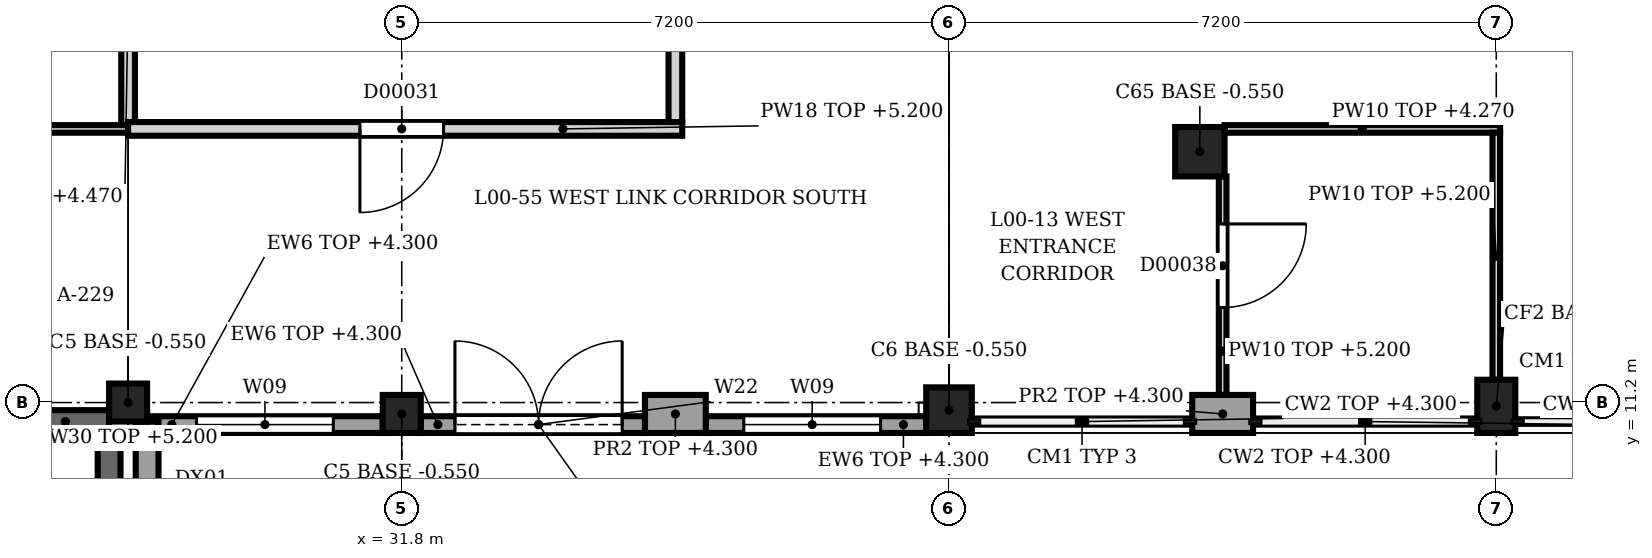
"""IFC4 building model, lengths in metres.
Left out: names, types, materials, properties, quantities, classifications, styles, units other than length and angle.
Written with IfcOpenShell. Run it as: python <this file> out.ifc"""

import sys

from ifc_helpers import new_model, si_unit, direction, frame, frame_2d, origin, origin_2d, place, context, subcontext, project, spatial, rectangle, extrude, element, fill, save


model = new_model("IFC4")
c1 = context("Model", 3, precision=1e-05, world=origin(), true_north=direction((0.0, 1.0)))
c2 = subcontext(c1, "Body", "Model", "MODEL_VIEW")
j1 = project(units=[si_unit("LENGTHUNIT", "METRE"), si_unit("PLANEANGLEUNIT", "RADIAN")], contexts=[c1])
p1 = place(None, origin())
s1 = spatial("IfcSite", under=j1, at=p1, CompositionType="ELEMENT")
p2 = place(p1, origin())
s2 = spatial("IfcBuilding", under=s1, at=p2, CompositionType="ELEMENT")
p3 = place(p2, origin())
s3 = spatial("IfcBuildingStorey", under=s2, at=p3, CompositionType="ELEMENT", Elevation=0.0)
p4 = place(p3, frame((39.0, 11.1, -0.55), z_axis=(0.0, 0.0, 1.0), x_axis=(1.0, 0.0, 0.0)))
e1 = element("IfcColumn", 1, at=p4, inside=s3, PredefinedType="COLUMN", context=c2, shape_type="SweptSolid", body=[
    extrude(rectangle(XDim=0.6, YDim=0.6, at=origin_2d()), origin(), (0.0, 0.0, 1.0), 5.95),
])
p5 = place(p3, frame((46.2, 11.15, -0.55), z_axis=(0.0, 0.0, 1.0), x_axis=(1.0, 0.0, 0.0)))
e2 = element("IfcColumn", 2, at=p5, inside=s3, PredefinedType="COLUMN", context=c2, shape_type="SweptSolid", body=[
    extrude(rectangle(XDim=0.5, YDim=0.7, at=origin_2d()), origin(), (0.0, 0.0, 1.0), 5.95),
])
p6 = place(p3, frame((42.3, 14.5, -0.55), z_axis=(0.0, 0.0, 1.0), x_axis=(1.0, 0.0, 0.0)))
e3 = element("IfcColumn", 3, at=p6, inside=s3, PredefinedType="COLUMN", context=c2, shape_type="SweptSolid", body=[
    extrude(rectangle(XDim=0.65, YDim=0.65, at=origin_2d()), origin(), (0.0, 0.0, 1.0), 5.95),
])
for number, where, z_axis, x_axis in (
    (4, (28.2, 11.2, -0.55), (0.0, 0.0, 1.0), (1.0, 0.0, 0.0)),
    (5, (31.8, 11.05, -0.55), (0.0, 0.0, 1.0), (1.0, 0.0, 0.0)),
):
    element("IfcColumn", number, at=place(p3, frame(where, z_axis=z_axis, x_axis=x_axis)), inside=s3, PredefinedType="COLUMN", context=c2, shape_type="SweptSolid", body=[
        extrude(rectangle(XDim=0.5, YDim=0.5, at=origin_2d()), origin(), (0.0, 0.0, 1.0), 5.95),
    ])
for number, where, z_axis, x_axis in (
    (6, (43.0, 11.05, 0.0), (0.0, 0.0, 1.0), (-1.0, 0.0, 0.0)),
    (7, (35.8, 11.05, 0.0), (0.0, 0.0, 1.0), (-1.0, 0.0, 0.0)),
):
    element("IfcWall", number, at=place(p3, frame(where, z_axis=z_axis, x_axis=x_axis)), inside=s3, PredefinedType="SOLIDWALL", context=c2, shape_type="SweptSolid", body=[
        extrude(rectangle(XDim=0.8, YDim=0.5, at=frame_2d((0.4, 0.0))), origin(), (0.0, 0.0, 1.0), 4.3),
    ])
p7 = place(p3, frame((38.7, 10.91, 0.0), z_axis=(0.0, 0.0, 1.0), x_axis=(-1.0, 0.0, 0.0)))
e8 = element("IfcWall", 8, at=p7, inside=s3, PredefinedType="SOLIDWALL", context=c2, shape_type="SweptSolid", body=[
    extrude(rectangle(XDim=2.9, YDim=0.22, at=frame_2d((1.45, 0.0))), origin(), (0.0, 0.0, 1.0), 4.3),
])
p8 = place(p7, frame((0.6, 0.0, 0.9)))
e9 = element("IfcOpeningElement", 9, at=p8, cuts=e8, PredefinedType="OPENING", context=c2, shape_type="SweptSolid", body=[
    extrude(rectangle(XDim=1.8, YDim=2.1, at=frame_2d((0.9, 1.05))), frame((0.0, 0.12, 0.0), z_axis=(0.0, -1.0, 0.0), x_axis=(1.0, 0.0, 0.0)), (0.0, 0.0, 1.0), 0.24),
])
p9 = place(p3, frame((35.0, 10.91, 0.0), z_axis=(0.0, 0.0, 1.0), x_axis=(-1.0, 0.0, 0.0)))
e10 = element("IfcWall", 10, at=p9, inside=s3, PredefinedType="SOLIDWALL", context=c2, shape_type="SweptSolid", body=[
    extrude(rectangle(XDim=2.95, YDim=0.22, at=frame_2d((1.475, 0.0))), origin(), (0.0, 0.0, 1.0), 4.3),
])
p10 = place(p9, frame((0.3, 0.0, 0.0)))
e11 = element("IfcOpeningElement", 11, at=p10, cuts=e10, PredefinedType="OPENING", context=c2, shape_type="SweptSolid", body=[
    extrude(rectangle(XDim=2.2, YDim=2.4, at=frame_2d((1.1, 1.2))), frame((0.0, 0.12, 0.0), z_axis=(0.0, -1.0, 0.0), x_axis=(1.0, 0.0, 0.0)), (0.0, 0.0, 1.0), 0.24),
])
p11 = place(p9, frame((0.3, 0.0, 2.5)))
e12 = element("IfcOpeningElement", 12, at=p11, cuts=e10, PredefinedType="OPENING", context=c2, shape_type="SweptSolid", body=[
    extrude(rectangle(XDim=2.2, YDim=0.45, at=frame_2d((1.1, 0.225))), frame((0.0, 0.12, 0.0), z_axis=(0.0, -1.0, 0.0), x_axis=(1.0, 0.0, 0.0)), (0.0, 0.0, 1.0), 0.24),
])
p12 = place(p3, frame((31.55, 10.91, 0.0), z_axis=(0.0, 0.0, 1.0), x_axis=(-1.0, 0.0, 0.0)))
e13 = element("IfcWall", 13, at=p12, inside=s3, PredefinedType="SOLIDWALL", context=c2, shape_type="SweptSolid", body=[
    extrude(rectangle(XDim=3.1, YDim=0.22, at=frame_2d((1.55, 0.0))), origin(), (0.0, 0.0, 1.0), 4.3),
])
p13 = place(p12, frame((0.65, 0.0, 0.9)))
e14 = element("IfcOpeningElement", 14, at=p13, cuts=e13, PredefinedType="OPENING", context=c2, shape_type="SweptSolid", body=[
    extrude(rectangle(XDim=1.8, YDim=2.1, at=frame_2d((0.9, 1.05))), frame((0.0, 0.12, 0.0), z_axis=(0.0, -1.0, 0.0), x_axis=(1.0, 0.0, 0.0)), (0.0, 0.0, 1.0), 0.24),
])
p14 = place(p3, frame((28.45, 10.95, 0.0), z_axis=(0.0, 0.0, 1.0), x_axis=(0.0, -1.0, 0.0)))
e15 = element("IfcWall", 15, at=p14, inside=s3, PredefinedType="SOLIDWALL", context=c2, shape_type="SweptSolid", body=[
    extrude(rectangle(XDim=6.95, YDim=0.3, at=frame_2d((3.475, 0.0))), origin(), (0.0, 0.0, 1.0), 4.3),
])
p15 = place(p14, frame((1.0, 0.0, 0.0)))
e16 = element("IfcOpeningElement", 16, at=p15, cuts=e15, PredefinedType="OPENING", context=c2, shape_type="SweptSolid", body=[
    extrude(rectangle(XDim=1.1, YDim=2.2, at=frame_2d((0.55, 1.1))), frame((0.0, 0.16, 0.0), z_axis=(0.0, -1.0, 0.0), x_axis=(1.0, 0.0, 0.0)), (0.0, 0.0, 1.0), 0.32),
])
p16 = place(p14, frame((1.0, 0.0, 2.3)))
e17 = element("IfcOpeningElement", 17, at=p16, cuts=e15, PredefinedType="OPENING", context=c2, shape_type="SweptSolid", body=[
    extrude(rectangle(XDim=1.1, YDim=0.45, at=frame_2d((0.55, 0.225))), frame((0.0, 0.16, 0.0), z_axis=(0.0, -1.0, 0.0), x_axis=(1.0, 0.0, 0.0)), (0.0, 0.0, 1.0), 0.32),
])
p17 = place(p3, frame((27.95, 10.95, 0.0), z_axis=(0.0, 0.0, 1.0), x_axis=(-1.0, 0.0, 0.0)))
e18 = element("IfcWall", 18, at=p17, inside=s3, PredefinedType="SHEAR", context=c2, shape_type="SweptSolid", body=[
    extrude(rectangle(XDim=3.0, YDim=0.3, at=frame_2d((1.5, 0.0))), origin(), (0.0, 0.0, 1.0), 5.2),
])
p18 = place(p17, frame((1.15, 0.0, 0.0)))
e19 = element("IfcOpeningElement", 19, at=p18, cuts=e18, PredefinedType="OPENING", context=c2, shape_type="SweptSolid", body=[
    extrude(rectangle(XDim=1.2, YDim=2.1, at=frame_2d((0.6, 1.05))), frame((0.0, 0.16, 0.0), z_axis=(0.0, -1.0, 0.0), x_axis=(1.0, 0.0, 0.0)), (0.0, 0.0, 1.0), 0.32),
])
p19 = place(p3, frame((27.95, 4.4, 0.0), z_axis=(0.0, 0.0, 1.0), x_axis=(0.0, 1.0, 0.0)))
e20 = element("IfcWall", 20, at=p19, inside=s3, PredefinedType="SHEAR", context=c2, shape_type="SweptSolid", body=[
    extrude(rectangle(XDim=6.4, YDim=0.3, at=frame_2d((3.2, 0.0))), origin(), (0.0, 0.0, 1.0), 5.2),
])
p20 = place(p19, frame((4.45, 0.0, 0.0)))
e21 = element("IfcOpeningElement", 21, at=p20, cuts=e20, PredefinedType="OPENING", context=c2, shape_type="SweptSolid", body=[
    extrude(rectangle(XDim=1.1, YDim=2.1, at=frame_2d((0.55, 1.05))), frame((0.0, 0.16, 0.0), z_axis=(0.0, -1.0, 0.0), x_axis=(1.0, 0.0, 0.0)), (0.0, 0.0, 1.0), 0.32),
])
p21 = place(p3, frame((24.6, 14.8, 0.0), z_axis=(0.0, 0.0, 1.0), x_axis=(1.0, 0.0, 0.0)))
e22 = element("IfcWall", 22, at=p21, inside=s3, PredefinedType="PARTITIONING", context=c2, shape_type="SweptSolid", body=[
    extrude(rectangle(XDim=3.6, YDim=0.1, at=frame_2d((1.8, 0.0))), origin(), (0.0, 0.0, 1.0), 5.2),
])
p22 = place(p21, frame((1.25, 0.0, 0.0)))
e23 = element("IfcOpeningElement", 23, at=p22, cuts=e22, PredefinedType="OPENING", context=c2, shape_type="SweptSolid", body=[
    extrude(rectangle(XDim=1.1, YDim=2.2, at=frame_2d((0.55, 1.1))), frame((0.0, 0.06, 0.0), z_axis=(0.0, -1.0, 0.0), x_axis=(1.0, 0.0, 0.0)), (0.0, 0.0, 1.0), 0.12),
])
p23 = place(p3, frame((28.2, 14.8, 0.0), z_axis=(0.0, 0.0, 1.0), x_axis=(1.0, 0.0, 0.0)))
e24 = element("IfcWall", 24, at=p23, inside=s3, PredefinedType="PARTITIONING", context=c2, shape_type="SweptSolid", body=[
    extrude(rectangle(XDim=7.29, YDim=0.18, at=frame_2d((3.645, 0.0))), origin(), (0.0, 0.0, 1.0), 5.2),
])
p24 = place(p23, frame((3.05, 0.0, 0.0)))
e25 = element("IfcOpeningElement", 25, at=p24, cuts=e24, PredefinedType="OPENING", context=c2, shape_type="SweptSolid", body=[
    extrude(rectangle(XDim=1.1, YDim=2.3, at=frame_2d((0.55, 1.15))), frame((0.0, 0.1, 0.0), z_axis=(0.0, -1.0, 0.0), x_axis=(1.0, 0.0, 0.0)), (0.0, 0.0, 1.0), 0.2),
])
p25 = place(p3, frame((42.625, 14.8, 0.0), z_axis=(0.0, 0.0, 1.0), x_axis=(1.0, 0.0, 0.0)))
e26 = element("IfcWall", 26, at=p25, inside=s3, PredefinedType="PARTITIONING", context=c2, shape_type="SweptSolid", body=[
    extrude(rectangle(XDim=3.625, YDim=0.1, at=frame_2d((1.812, 0.0))), origin(), (0.0, 0.0, 1.0), 4.27),
])
p26 = place(p3, frame((28.2, 14.85, 0.0), z_axis=(0.0, 0.0, 1.0), x_axis=(0.0, 1.0, 0.0)))
e27 = element("IfcWall", 27, at=p26, inside=s3, PredefinedType="PARTITIONING", context=c2, shape_type="SweptSolid", body=[
    extrude(rectangle(XDim=3.3, YDim=0.18, at=frame_2d((1.65, 0.0))), origin(), (0.0, 0.0, 1.0), 4.47),
])
p27 = place(p3, frame((35.4, 14.89, 0.0), z_axis=(0.0, 0.0, 1.0), x_axis=(0.0, 1.0, 0.0)))
e28 = element("IfcWall", 28, at=p27, inside=s3, PredefinedType="PARTITIONING", context=c2, shape_type="SweptSolid", body=[
    extrude(rectangle(XDim=7.02, YDim=0.18, at=frame_2d((3.51, 0.0))), origin(), (0.0, 0.0, 1.0), 4.92),
])
p28 = place(p3, frame((42.6, 14.175, 0.0), z_axis=(0.0, 0.0, 1.0), x_axis=(0.0, -1.0, 0.0)))
e29 = element("IfcWall", 29, at=p28, inside=s3, PredefinedType="PARTITIONING", context=c2, shape_type="SweptSolid", body=[
    extrude(rectangle(XDim=2.875, YDim=0.1, at=frame_2d((1.438, 0.0))), origin(), (0.0, 0.0, 1.0), 5.2),
])
p29 = place(p28, frame((0.625, 0.0, 0.0)))
e30 = element("IfcOpeningElement", 30, at=p29, cuts=e29, PredefinedType="OPENING", context=c2, shape_type="SweptSolid", body=[
    extrude(rectangle(XDim=1.1, YDim=2.2, at=frame_2d((0.55, 1.1))), frame((0.0, 0.06, 0.0), z_axis=(0.0, -1.0, 0.0), x_axis=(1.0, 0.0, 0.0)), (0.0, 0.0, 1.0), 0.12),
])
p30 = place(p3, frame((46.2, 11.5, 0.0), z_axis=(0.0, 0.0, 1.0), x_axis=(0.0, 1.0, 0.0)))
e31 = element("IfcWall", 31, at=p30, inside=s3, PredefinedType="PARTITIONING", context=c2, shape_type="SweptSolid", body=[
    extrude(rectangle(XDim=3.25, YDim=0.1, at=frame_2d((1.625, 0.0))), origin(), (0.0, 0.0, 1.0), 5.2),
])
p31 = place(p8, origin())
e32 = element("IfcWindow", 32, at=p31, inside=s3, PartitioningType="SINGLE_PANEL", PredefinedType="WINDOW", context=c2, shape_type="SweptSolid", body=[
    extrude(rectangle(XDim=1.8, YDim=2.1, at=frame_2d((0.9, 1.05))), frame((0.0, 0.03, 0.0), z_axis=(0.0, -1.0, 0.0), x_axis=(1.0, 0.0, 0.0)), (0.0, 0.0, 1.0), 0.06),
])
fill(e9, e32)
p32 = place(p10, origin())
e33 = element("IfcDoor", 33, at=p32, inside=s3, OperationType="SINGLE_SWING_LEFT", PredefinedType="DOOR", context=c2, shape_type="SweptSolid", body=[
    extrude(rectangle(XDim=2.2, YDim=2.4, at=frame_2d((1.1, 1.2))), frame((0.0, 0.025, 0.0), z_axis=(0.0, -1.0, 0.0), x_axis=(1.0, 0.0, 0.0)), (0.0, 0.0, 1.0), 0.05),
])
fill(e11, e33)
p33 = place(p11, origin())
e34 = element("IfcWindow", 34, at=p33, inside=s3, PartitioningType="SINGLE_PANEL", PredefinedType="WINDOW", context=c2, shape_type="SweptSolid", body=[
    extrude(rectangle(XDim=2.2, YDim=0.45, at=frame_2d((1.1, 0.225))), frame((0.0, 0.03, 0.0), z_axis=(0.0, -1.0, 0.0), x_axis=(1.0, 0.0, 0.0)), (0.0, 0.0, 1.0), 0.06),
])
fill(e12, e34)
p34 = place(p13, origin())
e35 = element("IfcWindow", 35, at=p34, inside=s3, PartitioningType="SINGLE_PANEL", PredefinedType="WINDOW", context=c2, shape_type="SweptSolid", body=[
    extrude(rectangle(XDim=1.8, YDim=2.1, at=frame_2d((0.9, 1.05))), frame((0.0, 0.03, 0.0), z_axis=(0.0, -1.0, 0.0), x_axis=(1.0, 0.0, 0.0)), (0.0, 0.0, 1.0), 0.06),
])
fill(e14, e35)
p35 = place(p24, origin())
e36 = element("IfcDoor", 36, at=p35, inside=s3, OperationType="SINGLE_SWING_LEFT", PredefinedType="DOOR", context=c2, shape_type="SweptSolid", body=[
    extrude(rectangle(XDim=1.1, YDim=2.3, at=frame_2d((0.55, 1.15))), frame((0.0, 0.025, 0.0), z_axis=(0.0, -1.0, 0.0), x_axis=(1.0, 0.0, 0.0)), (0.0, 0.0, 1.0), 0.05),
])
fill(e25, e36)
p36 = place(p29, origin())
e37 = element("IfcDoor", 37, at=p36, inside=s3, OperationType="SINGLE_SWING_LEFT", PredefinedType="DOOR", context=c2, shape_type="SweptSolid", body=[
    extrude(rectangle(XDim=1.1, YDim=2.2, at=frame_2d((0.55, 1.1))), frame((0.0, 0.025, 0.0), z_axis=(0.0, -1.0, 0.0), x_axis=(1.0, 0.0, 0.0)), (0.0, 0.0, 1.0), 0.05),
])
fill(e30, e37)
save(model, sys.argv[1])
